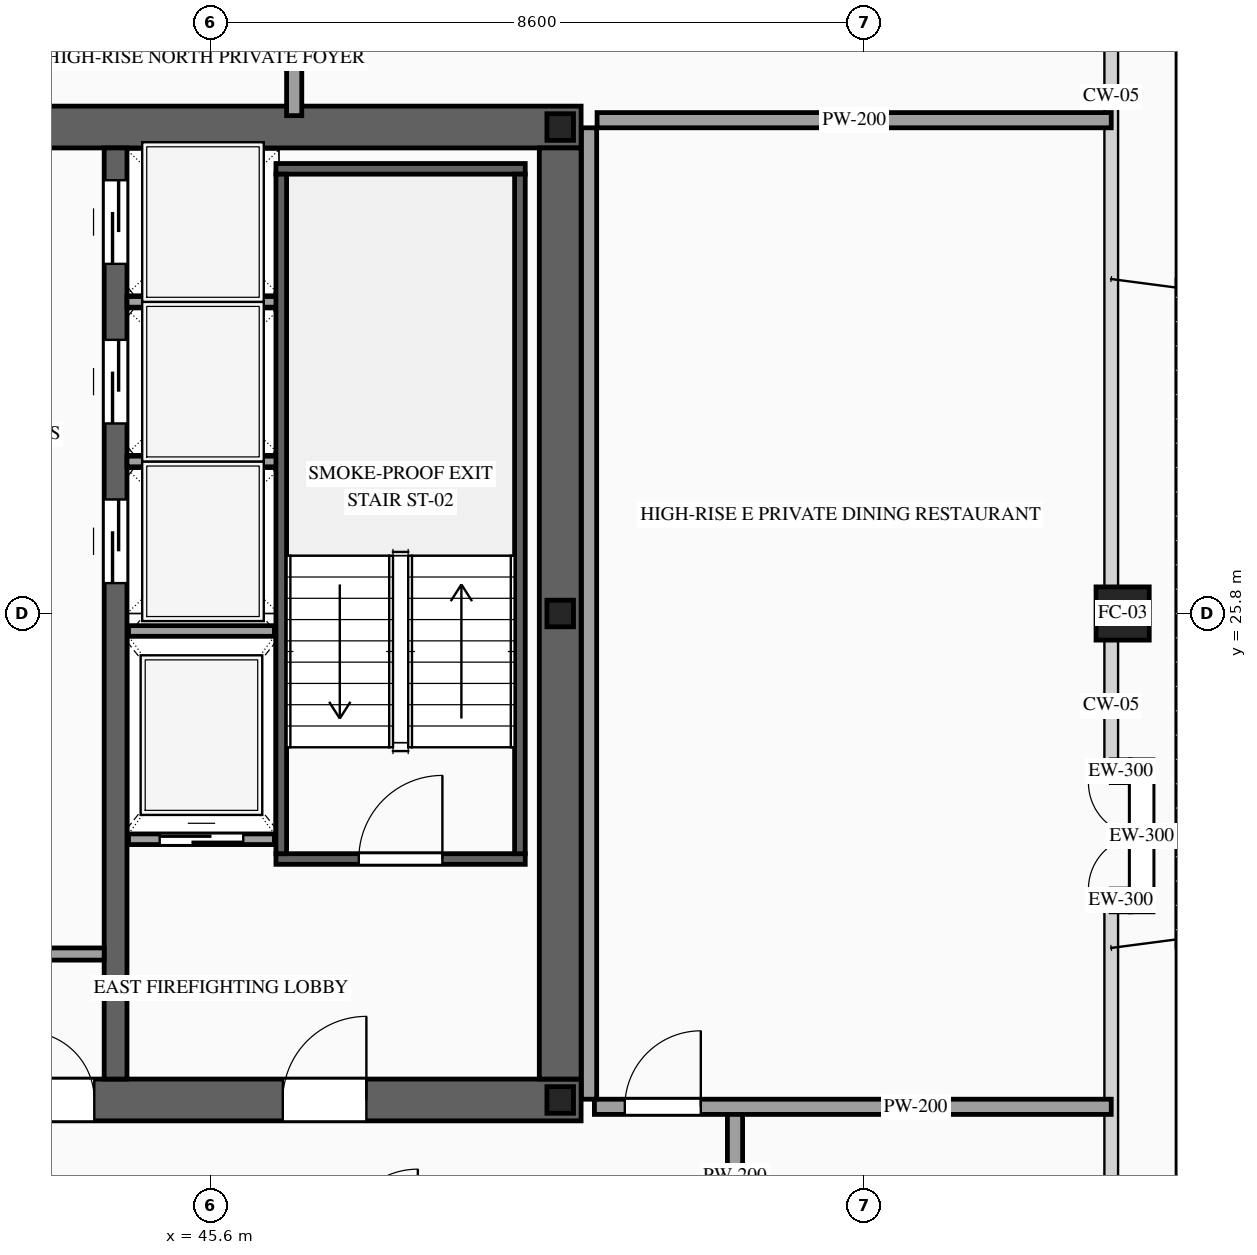
"""IFC4 building model, lengths in metres.
Left out: names, types, materials, properties, quantities, classifications, styles, units other than length and angle.
Written with IfcOpenShell. Run it as: python <this file> out.ifc"""

import sys

from ifc_helpers import new_model, si_unit, direction, frame, frame_2d, origin, origin_2d, place, context, subcontext, project, spatial, rectangle, hollow_rectangle, i_section, extrude, source, transform, mapped, element, fill, save


model = new_model("IFC4")
c1 = context("Model", 3, precision=1e-05, world=origin(), true_north=direction((0.0, 1.0)))
c2 = subcontext(c1, "Body", "Model", "MODEL_VIEW")
j1 = project(units=[si_unit("LENGTHUNIT", "METRE"), si_unit("PLANEANGLEUNIT", "RADIAN")], contexts=[c1])
p1 = place(None, origin())
s1 = spatial("IfcSite", under=j1, at=p1, CompositionType="ELEMENT")
p2 = place(p1, origin())
s2 = spatial("IfcBuilding", under=s1, at=p2, CompositionType="ELEMENT")
p3 = place(p2, frame((0.0, 0.0, 278.6)))
s3 = spatial("IfcBuildingStorey", under=s2, at=p3, CompositionType="ELEMENT", Elevation=278.6)
p4 = place(p3, frame((23.525, 19.4, 0.0), z_axis=(0.0, 0.0, 1.0), x_axis=(1.0, 0.0, 0.0)))
e1 = element("IfcWall", 1, at=p4, inside=s3, PredefinedType="SHEAR", context=c2, shape_type="SweptSolid", body=[
    extrude(rectangle(XDim=26.95, YDim=0.55, at=frame_2d((13.475, 0.0))), origin(), (0.0, 0.0, 1.0), 3.5),
])
p5 = place(p4, frame((1.925, 0.0, 0.0)))
e2 = element("IfcOpeningElement", 2, at=p5, cuts=e1, PredefinedType="OPENING", context=c2, shape_type="SweptSolid", body=[
    extrude(rectangle(XDim=1.1, YDim=2.2, at=frame_2d((0.55, 1.1))), frame((0.0, 0.29, 0.0), z_axis=(0.0, -1.0, 0.0), x_axis=(1.0, 0.0, 0.0)), (0.0, 0.0, 1.0), 0.58),
])
p6 = place(p4, frame((9.825, 0.0, 0.0)))
e3 = element("IfcOpeningElement", 3, at=p6, cuts=e1, PredefinedType="OPENING", context=c2, shape_type="SweptSolid", body=[
    extrude(rectangle(XDim=1.1, YDim=2.2, at=frame_2d((0.55, 1.1))), frame((0.0, 0.29, 0.0), z_axis=(0.0, -1.0, 0.0), x_axis=(1.0, 0.0, 0.0)), (0.0, 0.0, 1.0), 0.58),
])
p7 = place(p4, frame((23.025, 0.0, 0.0)))
e4 = element("IfcOpeningElement", 4, at=p7, cuts=e1, PredefinedType="OPENING", context=c2, shape_type="SweptSolid", body=[
    extrude(rectangle(XDim=1.1, YDim=2.2, at=frame_2d((0.55, 1.1))), frame((0.0, 0.29, 0.0), z_axis=(0.0, -1.0, 0.0), x_axis=(1.0, 0.0, 0.0)), (0.0, 0.0, 1.0), 0.58),
])
p8 = place(p4, frame((19.645, 0.0, 0.0)))
e5 = element("IfcOpeningElement", 5, at=p8, cuts=e1, PredefinedType="OPENING", context=c2, shape_type="SweptSolid", body=[
    extrude(rectangle(XDim=0.9, YDim=2.15, at=frame_2d((0.45, 1.075))), frame((0.0, 0.29, 0.0), z_axis=(0.0, -1.0, 0.0), x_axis=(1.0, 0.0, 0.0)), (0.0, 0.0, 1.0), 0.58),
])
p9 = place(p4, frame((18.205, 0.0, 0.0)))
e6 = element("IfcOpeningElement", 6, at=p9, cuts=e1, PredefinedType="OPENING", context=c2, shape_type="SweptSolid", body=[
    extrude(rectangle(XDim=0.9, YDim=2.15, at=frame_2d((0.45, 1.075))), frame((0.0, 0.29, 0.0), z_axis=(0.0, -1.0, 0.0), x_axis=(1.0, 0.0, 0.0)), (0.0, 0.0, 1.0), 0.58),
])
p10 = place(p3, frame((23.525, 32.2, 0.0), z_axis=(0.0, 0.0, 1.0), x_axis=(1.0, 0.0, 0.0)))
e7 = element("IfcWall", 7, at=p10, inside=s3, PredefinedType="SHEAR", context=c2, shape_type="SweptSolid", body=[
    extrude(rectangle(XDim=26.95, YDim=0.55, at=frame_2d((13.475, 0.0))), origin(), (0.0, 0.0, 1.0), 3.5),
])
p11 = place(p10, frame((4.545, 0.0, 0.0)))
e8 = element("IfcOpeningElement", 8, at=p11, cuts=e7, PredefinedType="OPENING", context=c2, shape_type="SweptSolid", body=[
    extrude(rectangle(XDim=0.9, YDim=2.15, at=frame_2d((0.45, 1.075))), frame((0.0, 0.29, 0.0), z_axis=(0.0, -1.0, 0.0), x_axis=(1.0, 0.0, 0.0)), (0.0, 0.0, 1.0), 0.58),
])
p12 = place(p10, frame((9.825, 0.0, 0.0)))
e9 = element("IfcOpeningElement", 9, at=p12, cuts=e7, PredefinedType="OPENING", context=c2, shape_type="SweptSolid", body=[
    extrude(rectangle(XDim=1.1, YDim=2.2, at=frame_2d((0.55, 1.1))), frame((0.0, 0.29, 0.0), z_axis=(0.0, -1.0, 0.0), x_axis=(1.0, 0.0, 0.0)), (0.0, 0.0, 1.0), 0.58),
])
p13 = place(p10, frame((15.675, 0.0, 0.0)))
e10 = element("IfcOpeningElement", 10, at=p13, cuts=e7, PredefinedType="OPENING", context=c2, shape_type="SweptSolid", body=[
    extrude(rectangle(XDim=1.1, YDim=2.2, at=frame_2d((0.55, 1.1))), frame((0.0, 0.29, 0.0), z_axis=(0.0, -1.0, 0.0), x_axis=(1.0, 0.0, 0.0)), (0.0, 0.0, 1.0), 0.58),
])
p14 = place(p10, frame((18.775, 0.0, 0.0)))
e11 = element("IfcOpeningElement", 11, at=p14, cuts=e7, PredefinedType="OPENING", context=c2, shape_type="SweptSolid", body=[
    extrude(rectangle(XDim=1.1, YDim=2.2, at=frame_2d((0.55, 1.1))), frame((0.0, 0.29, 0.0), z_axis=(0.0, -1.0, 0.0), x_axis=(1.0, 0.0, 0.0)), (0.0, 0.0, 1.0), 0.58),
])
m1 = source(origin(), c2, "Body", "SweptSolid", [
    extrude(rectangle(XDim=12.25, YDim=0.55, at=frame_2d((6.125, 0.0))), origin(), (0.0, 0.0, 1.0), 3.5),
])
p15 = place(p3, frame((50.2, 19.675, 0.0), z_axis=(0.0, 0.0, 1.0), x_axis=(0.0, 1.0, 0.0)))
e12 = element("IfcWall", 12, at=p15, inside=s3, PredefinedType="SHEAR", context=c2, shape_type="MappedRepresentation", body=[
    mapped(m1, transform((0.0, 0.0, 0.0), scale=1.0)),
])
p16 = place(p3, frame((44.35, 19.675, 0.0), z_axis=(0.0, 0.0, 1.0), x_axis=(0.0, 1.0, 0.0)))
e13 = element("IfcWall", 13, at=p16, inside=s3, PredefinedType="SOLIDWALL", context=c2, shape_type="SweptSolid", body=[
    extrude(rectangle(XDim=12.25, YDim=0.3, at=frame_2d((6.125, 0.0))), origin(), (0.0, 0.0, 1.0), 3.5),
])
p17 = place(p16, frame((6.525, 0.0, 0.0)))
e14 = element("IfcOpeningElement", 14, at=p17, cuts=e13, PredefinedType="OPENING", context=c2, shape_type="SweptSolid", body=[
    extrude(rectangle(XDim=1.1, YDim=2.2, at=frame_2d((0.55, 1.1))), frame((0.0, 0.165, 0.0), z_axis=(0.0, -1.0, 0.0), x_axis=(1.0, 0.0, 0.0)), (0.0, 0.0, 1.0), 0.33),
])
p18 = place(p16, frame((8.625, 0.0, 0.0)))
e15 = element("IfcOpeningElement", 15, at=p18, cuts=e13, PredefinedType="OPENING", context=c2, shape_type="SweptSolid", body=[
    extrude(rectangle(XDim=1.1, YDim=2.2, at=frame_2d((0.55, 1.1))), frame((0.0, 0.165, 0.0), z_axis=(0.0, -1.0, 0.0), x_axis=(1.0, 0.0, 0.0)), (0.0, 0.0, 1.0), 0.33),
])
p19 = place(p16, frame((10.725, 0.0, 0.0)))
e16 = element("IfcOpeningElement", 16, at=p19, cuts=e13, PredefinedType="OPENING", context=c2, shape_type="SweptSolid", body=[
    extrude(rectangle(XDim=1.1, YDim=2.2, at=frame_2d((0.55, 1.1))), frame((0.0, 0.165, 0.0), z_axis=(0.0, -1.0, 0.0), x_axis=(1.0, 0.0, 0.0)), (0.0, 0.0, 1.0), 0.33),
])
m2 = source(origin(), c2, "Body", "SweptSolid", [
    extrude(i_section(OverallWidth=0.35, OverallDepth=0.35, WebThickness=0.012, FlangeThickness=0.019, at=origin_2d()), origin(), (0.0, 0.0, 1.0), 3.5),
])
for number, where, z_axis, x_axis in (
    (17, (50.2, 19.4, 0.0), (0.0, 0.0, 1.0), (1.0, 0.0, 0.0)),
    (18, (50.2, 25.8, 0.0), (0.0, 0.0, 1.0), (1.0, 0.0, 0.0)),
    (19, (50.2, 32.2, 0.0), (0.0, 0.0, 1.0), (1.0, 0.0, 0.0)),
):
    element("IfcColumn", number, at=place(p3, frame(where, z_axis=z_axis, x_axis=x_axis)), inside=s3, PredefinedType="COLUMN", context=c2, shape_type="MappedRepresentation", body=[
        mapped(m2, transform((0.0, 0.0, 0.0), scale=1.0)),
    ])
m3 = source(origin(), c2, "Body", "SweptSolid", [
    extrude(hollow_rectangle(XDim=0.7, YDim=0.7, WallThickness=0.032, at=origin_2d()), origin(), (0.0, 0.0, 1.0), 3.5),
])
p20 = place(p3, frame((57.6, 25.8, 0.0), z_axis=(0.0, 0.0, 1.0), x_axis=(1.0, 0.0, 0.0)))
e20 = element("IfcColumn", 20, at=p20, inside=s3, PredefinedType="COLUMN", context=c2, shape_type="MappedRepresentation", body=[
    mapped(m3, transform((0.0, 0.0, 0.0), scale=1.0)),
])
p21 = place(p3, frame((57.85, 21.875, 0.0), z_axis=(0.0, 0.0, 1.0), x_axis=(0.0, 1.0, 0.0)))
e21 = element("IfcWall", 21, at=p21, inside=s3, PredefinedType="SOLIDWALL", context=c2, shape_type="SweptSolid", body=[
    extrude(rectangle(XDim=2.0, YDim=0.3, at=frame_2d((1.0, 0.0))), origin(), (0.0, 0.0, 1.0), 2.835),
])
p22 = place(p21, frame((0.3, 0.0, 0.0)))
e22 = element("IfcOpeningElement", 22, at=p22, cuts=e21, PredefinedType="OPENING", context=c2, shape_type="SweptSolid", body=[
    extrude(rectangle(XDim=1.4, YDim=2.3, at=frame_2d((0.7, 1.15))), frame((0.0, 0.165, 0.0), z_axis=(0.0, -1.0, 0.0), x_axis=(1.0, 0.0, 0.0)), (0.0, 0.0, 1.0), 0.33),
])
m4 = source(origin(), c2, "Body", "SweptSolid", [
    extrude(rectangle(XDim=0.25, YDim=0.3, at=frame_2d((0.125, 0.0))), origin(), (0.0, 0.0, 1.0), 3.28),
])
for number, where, z_axis, x_axis in (
    (23, (57.45, 22.025, 0.0), (0.0, 0.0, 1.0), (1.0, 0.0, 0.0)),
    (24, (57.7, 23.725, 0.0), (0.0, 0.0, 1.0), (-1.0, 0.0, 0.0)),
):
    element("IfcWall", number, at=place(p3, frame(where, z_axis=z_axis, x_axis=x_axis)), inside=s3, PredefinedType="SOLIDWALL", context=c2, shape_type="MappedRepresentation", body=[
        mapped(m4, transform((0.0, 0.0, 0.0), scale=1.0)),
    ])
p23 = place(p3, frame((44.52, 22.83, 0.0), z_axis=(0.0, 0.0, 1.0), x_axis=(1.0, 0.0, 0.0)))
e25 = element("IfcWall", 25, at=p23, inside=s3, PredefinedType="SOLIDWALL", context=c2, shape_type="SweptSolid", body=[
    extrude(rectangle(XDim=1.92, YDim=0.14, at=frame_2d((0.96, 0.0))), origin(), (0.0, 0.0, 1.0), 3.28),
])
p24 = place(p23, frame((0.41, 0.0, 0.0)))
e26 = element("IfcOpeningElement", 26, at=p24, cuts=e25, PredefinedType="OPENING", context=c2, shape_type="SweptSolid", body=[
    extrude(rectangle(XDim=1.1, YDim=2.2, at=frame_2d((0.55, 1.1))), frame((0.0, 0.085, 0.0), z_axis=(0.0, -1.0, 0.0), x_axis=(1.0, 0.0, 0.0)), (0.0, 0.0, 1.0), 0.17),
])
m5 = source(origin(), c2, "Body", "SweptSolid", [
    extrude(rectangle(XDim=1.92, YDim=0.14, at=frame_2d((0.96, 0.0))), origin(), (0.0, 0.0, 1.0), 3.28),
])
p25 = place(p3, frame((44.52, 25.57, 0.0), z_axis=(0.0, 0.0, 1.0), x_axis=(1.0, 0.0, 0.0)))
e27 = element("IfcWall", 27, at=p25, inside=s3, PredefinedType="SOLIDWALL", context=c2, shape_type="MappedRepresentation", body=[
    mapped(m5, transform((0.0, 0.0, 0.0), scale=1.0)),
])
m6 = source(origin(), c2, "Body", "SweptSolid", [
    extrude(rectangle(XDim=2.0, YDim=0.14, at=frame_2d((1.0, 0.0))), origin(), (0.0, 0.0, 1.0), 3.28),
])
for number, where, z_axis, x_axis in (
    (28, (44.5, 27.8, 0.0), (0.0, 0.0, 1.0), (1.0, 0.0, 0.0)),
    (29, (44.5, 29.9, 0.0), (0.0, 0.0, 1.0), (1.0, 0.0, 0.0)),
):
    element("IfcWall", number, at=place(p3, frame(where, z_axis=z_axis, x_axis=x_axis)), inside=s3, PredefinedType="SOLIDWALL", context=c2, shape_type="MappedRepresentation", body=[
        mapped(m6, transform((0.0, 0.0, 0.0), scale=1.0)),
    ])
p26 = place(p3, frame((46.46, 22.57, 0.0), z_axis=(0.0, 0.0, 1.0), x_axis=(1.0, 0.0, 0.0)))
e30 = element("IfcWall", 30, at=p26, inside=s3, PredefinedType="SOLIDWALL", context=c2, shape_type="SweptSolid", body=[
    extrude(rectangle(XDim=3.28, YDim=0.14, at=frame_2d((1.64, 0.0))), origin(), (0.0, 0.0, 1.0), 3.28),
])
p27 = place(p26, frame((1.09, 0.0, 0.0)))
e31 = element("IfcOpeningElement", 31, at=p27, cuts=e30, PredefinedType="OPENING", context=c2, shape_type="SweptSolid", body=[
    extrude(rectangle(XDim=1.1, YDim=2.2, at=frame_2d((0.55, 1.1))), frame((0.0, 0.085, 0.0), z_axis=(0.0, -1.0, 0.0), x_axis=(1.0, 0.0, 0.0)), (0.0, 0.0, 1.0), 0.17),
])
m7 = source(origin(), c2, "Body", "SweptSolid", [
    extrude(rectangle(XDim=3.28, YDim=0.14, at=frame_2d((1.64, 0.0))), origin(), (0.0, 0.0, 1.0), 3.28),
])
p28 = place(p3, frame((46.46, 31.65, 0.0), z_axis=(0.0, 0.0, 1.0), x_axis=(1.0, 0.0, 0.0)))
e32 = element("IfcWall", 32, at=p28, inside=s3, PredefinedType="SOLIDWALL", context=c2, shape_type="MappedRepresentation", body=[
    mapped(m7, transform((0.0, 0.0, 0.0), scale=1.0)),
])
m8 = source(origin(), c2, "Body", "SweptSolid", [
    extrude(rectangle(XDim=8.94, YDim=0.14, at=frame_2d((4.47, 0.0))), origin(), (0.0, 0.0, 1.0), 3.28),
])
for number, where, z_axis, x_axis in (
    (33, (46.53, 22.64, 0.0), (0.0, 0.0, 1.0), (0.0, 1.0, 0.0)),
    (34, (49.67, 22.64, 0.0), (0.0, 0.0, 1.0), (0.0, 1.0, 0.0)),
):
    element("IfcWall", number, at=place(p3, frame(where, z_axis=z_axis, x_axis=x_axis)), inside=s3, PredefinedType="SOLIDWALL", context=c2, shape_type="MappedRepresentation", body=[
        mapped(m8, transform((0.0, 0.0, 0.0), scale=1.0)),
    ])
m9 = source(origin(), c2, "Body", "SweptSolid", [
    extrude(rectangle(XDim=1.17, YDim=0.16, at=frame_2d((0.585, 0.0))), origin(), (0.0, 0.0, 1.0), 3.28),
])
p29 = place(p3, frame((43.03, 21.32, 0.0), z_axis=(0.0, 0.0, 1.0), x_axis=(1.0, 0.0, 0.0)))
e35 = element("IfcWall", 35, at=p29, inside=s3, PredefinedType="PARTITIONING", context=c2, shape_type="MappedRepresentation", body=[
    mapped(m9, transform((0.0, 0.0, 0.0), scale=1.0)),
])
m10 = source(origin(), c2, "Body", "SweptSolid", [
    extrude(rectangle(XDim=1.7, YDim=0.2, at=frame_2d((0.85, 0.0))), origin(), (0.0, 0.0, 1.0), 3.28),
])
for number, where, z_axis, x_axis in (
    (36, (46.7, 32.35, 0.0), (0.0, 0.0, 1.0), (0.0, 1.0, 0.0)),
    (37, (52.5, 17.55, 0.0), (0.0, 0.0, 1.0), (0.0, 1.0, 0.0)),
):
    element("IfcWall", number, at=place(p3, frame(where, z_axis=z_axis, x_axis=x_axis)), inside=s3, PredefinedType="PARTITIONING", context=c2, shape_type="MappedRepresentation", body=[
        mapped(m10, transform((0.0, 0.0, 0.0), scale=1.0)),
    ])
p30 = place(p3, frame((50.65, 19.31, 0.0), z_axis=(0.0, 0.0, 1.0), x_axis=(1.0, 0.0, 0.0)))
e38 = element("IfcWall", 38, at=p30, inside=s3, PredefinedType="PARTITIONING", context=c2, shape_type="SweptSolid", body=[
    extrude(rectangle(XDim=6.8, YDim=0.2, at=frame_2d((3.4, 0.0))), origin(), (0.0, 0.0, 1.0), 2.825),
])
p31 = place(p30, frame((0.4, 0.0, 0.0)))
e39 = element("IfcOpeningElement", 39, at=p31, cuts=e38, PredefinedType="OPENING", context=c2, shape_type="SweptSolid", body=[
    extrude(rectangle(XDim=1.0, YDim=2.2, at=frame_2d((0.5, 1.1))), frame((0.0, 0.115, 0.0), z_axis=(0.0, -1.0, 0.0), x_axis=(1.0, 0.0, 0.0)), (0.0, 0.0, 1.0), 0.23),
])
m11 = source(origin(), c2, "Body", "SweptSolid", [
    extrude(rectangle(XDim=6.765, YDim=0.2, at=frame_2d((3.382, 0.0))), origin(), (0.0, 0.0, 1.0), 2.825),
])
p32 = place(p3, frame((50.685, 32.29, 0.0), z_axis=(0.0, 0.0, 1.0), x_axis=(1.0, 0.0, 0.0)))
e40 = element("IfcWall", 40, at=p32, inside=s3, PredefinedType="PARTITIONING", context=c2, shape_type="MappedRepresentation", body=[
    mapped(m11, transform((0.0, 0.0, 0.0), scale=1.0)),
])
m12 = source(origin(), c2, "Body", "SweptSolid", [
    extrude(rectangle(XDim=12.78, YDim=0.2, at=frame_2d((6.39, 0.0))), origin(), (0.0, 0.0, 1.0), 3.28),
])
p33 = place(p3, frame((50.58, 19.41, 0.0), z_axis=(0.0, 0.0, 1.0), x_axis=(0.0, 1.0, 0.0)))
e41 = element("IfcWall", 41, at=p33, inside=s3, PredefinedType="PARTITIONING", context=c2, shape_type="MappedRepresentation", body=[
    mapped(m12, transform((0.0, 0.0, 0.0), scale=1.0)),
])
m13 = source(origin(), c2, "Body", "SweptSolid", [
    extrude(rectangle(XDim=1.4, YDim=2.3, at=frame_2d((0.7, 1.15))), frame((0.0, 0.025, 0.0), z_axis=(0.0, -1.0, 0.0), x_axis=(1.0, 0.0, 0.0)), (0.0, 0.0, 1.0), 0.05),
])
p34 = place(p22, origin())
e42 = element("IfcDoor", 42, at=p34, inside=s3, OperationType="DOUBLE_DOOR_SINGLE_SWING", PredefinedType="DOOR", context=c2, shape_type="MappedRepresentation", body=[
    mapped(m13, transform((0.0, 0.0, 0.0), scale=1.0)),
])
fill(e22, e42)
m14 = source(origin(), c2, "Body", "SweptSolid", [
    extrude(rectangle(XDim=1.1, YDim=2.2, at=frame_2d((0.55, 1.1))), frame((0.0, 0.025, 0.0), z_axis=(0.0, -1.0, 0.0), x_axis=(1.0, 0.0, 0.0)), (0.0, 0.0, 1.0), 0.05),
])
p35 = place(p24, origin())
e43 = element("IfcDoor", 43, at=p35, inside=s3, OperationType="SLIDING_TO_RIGHT", PredefinedType="DOOR", context=c2, shape_type="MappedRepresentation", body=[
    mapped(m14, transform((0.0, 0.0, 0.0), scale=1.0)),
])
fill(e26, e43)
p36 = place(p17, origin())
e44 = element("IfcDoor", 44, at=p36, inside=s3, OperationType="SLIDING_TO_LEFT", PredefinedType="DOOR", context=c2, shape_type="MappedRepresentation", body=[
    mapped(m14, transform((0.0, 0.0, 0.0), scale=1.0)),
])
fill(e14, e44)
p37 = place(p18, origin())
e45 = element("IfcDoor", 45, at=p37, inside=s3, OperationType="SLIDING_TO_RIGHT", PredefinedType="DOOR", context=c2, shape_type="MappedRepresentation", body=[
    mapped(m14, transform((0.0, 0.0, 0.0), scale=1.0)),
])
fill(e15, e45)
p38 = place(p19, origin())
e46 = element("IfcDoor", 46, at=p38, inside=s3, OperationType="SLIDING_TO_LEFT", PredefinedType="DOOR", context=c2, shape_type="MappedRepresentation", body=[
    mapped(m14, transform((0.0, 0.0, 0.0), scale=1.0)),
])
fill(e16, e46)
m15 = source(origin(), c2, "Body", "SweptSolid", [
    extrude(rectangle(XDim=1.1, YDim=2.2, at=frame_2d((0.55, 1.1))), frame((0.0, 0.025, 0.0), z_axis=(0.0, -1.0, 0.0), x_axis=(1.0, 0.0, 0.0)), (0.0, 0.0, 1.0), 0.05),
])
p39 = place(p27, origin())
e47 = element("IfcDoor", 47, at=p39, inside=s3, OperationType="SINGLE_SWING_RIGHT", PredefinedType="DOOR", context=c2, shape_type="MappedRepresentation", body=[
    mapped(m15, transform((0.0, 0.0, 0.0), scale=1.0)),
])
fill(e31, e47)
p40 = place(p7, origin())
e48 = element("IfcDoor", 48, at=p40, inside=s3, OperationType="SINGLE_SWING_RIGHT", PredefinedType="DOOR", context=c2, shape_type="MappedRepresentation", body=[
    mapped(m15, transform((0.0, 0.0, 0.0), scale=1.0)),
])
fill(e4, e48)
m16 = source(origin(), c2, "Body", "SweptSolid", [
    extrude(rectangle(XDim=0.9, YDim=2.15, at=frame_2d((0.45, 1.075))), frame((0.0, 0.025, 0.0), z_axis=(0.0, -1.0, 0.0), x_axis=(1.0, 0.0, 0.0)), (0.0, 0.0, 1.0), 0.05),
])
p41 = place(p8, origin())
e49 = element("IfcDoor", 49, at=p41, inside=s3, OperationType="SINGLE_SWING_LEFT", PredefinedType="DOOR", context=c2, shape_type="MappedRepresentation", body=[
    mapped(m16, transform((0.0, 0.0, 0.0), scale=1.0)),
])
fill(e5, e49)
m17 = source(origin(), c2, "Body", "SweptSolid", [
    extrude(rectangle(XDim=1.0, YDim=2.2, at=frame_2d((0.5, 1.1))), frame((0.0, 0.025, 0.0), z_axis=(0.0, -1.0, 0.0), x_axis=(1.0, 0.0, 0.0)), (0.0, 0.0, 1.0), 0.05),
])
p42 = place(p31, origin())
e50 = element("IfcDoor", 50, at=p42, inside=s3, OperationType="SINGLE_SWING_RIGHT", PredefinedType="DOOR", context=c2, shape_type="MappedRepresentation", body=[
    mapped(m17, transform((0.0, 0.0, 0.0), scale=1.0)),
])
fill(e39, e50)
save(model, sys.argv[1])
